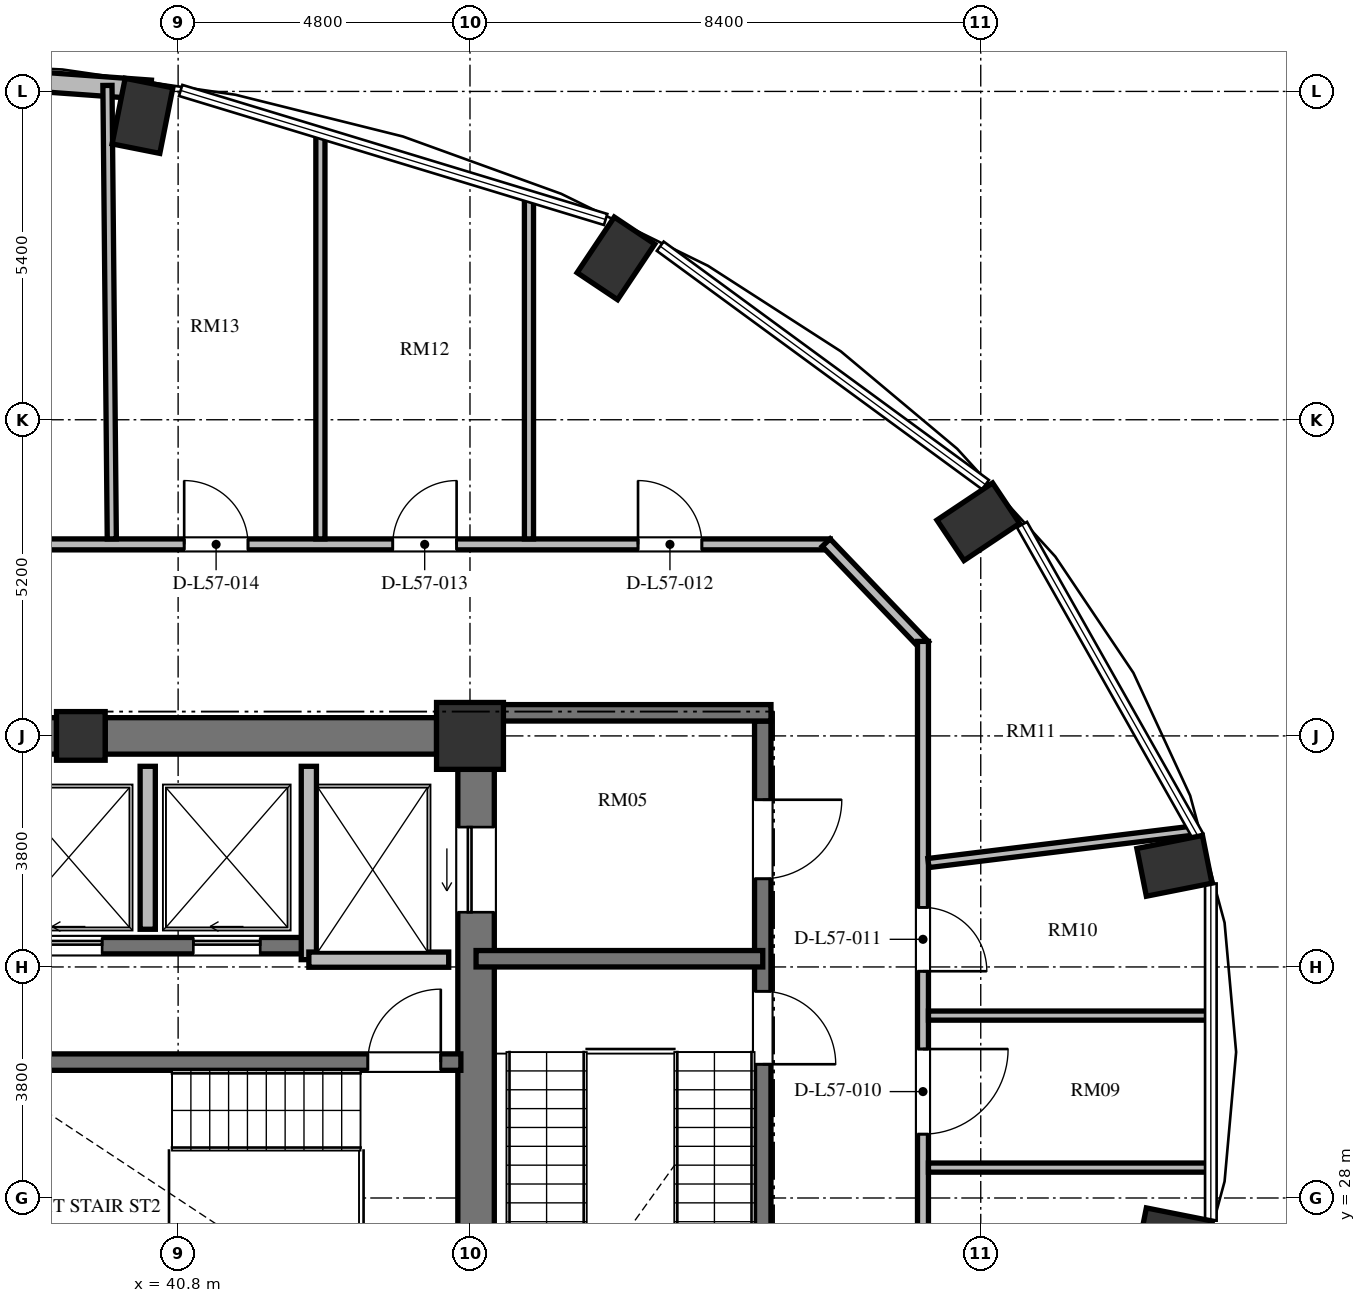
"""IFC4 building model, lengths in metres.
Left out: names, types, materials, properties, quantities, classifications, styles, units other than length and angle.
Written with IfcOpenShell. Run it as: python <this file> out.ifc"""

import sys

from ifc_helpers import new_model, si_unit, direction, frame, frame_2d, origin, origin_2d, place, context, subcontext, project, spatial, rectangle, extrude, element, fill, save


model = new_model("IFC4")
c1 = context("Model", 3, precision=1e-05, world=origin(), true_north=direction((0.0, 1.0)))
c2 = subcontext(c1, "Body", "Model", "MODEL_VIEW")
j1 = project(units=[si_unit("LENGTHUNIT", "METRE"), si_unit("PLANEANGLEUNIT", "RADIAN")], contexts=[c1])
p1 = place(None, origin())
s1 = spatial("IfcSite", under=j1, at=p1, CompositionType="ELEMENT")
p2 = place(p1, origin())
s2 = spatial("IfcBuilding", under=s1, at=p2, CompositionType="ELEMENT")
p3 = place(p2, frame((0.0, 0.0, 220.368)))
s3 = spatial("IfcBuildingStorey", under=s2, at=p3, CompositionType="ELEMENT", Elevation=220.368)
for number, where, z_axis, x_axis in (
    (1, (57.185, 27.337, 0.0), (0.0, 0.0, 1.0), (0.981, -0.195, 0.0)),
    (2, (57.185, 33.463, 0.0), (0.0, 0.0, 1.0), (0.981, 0.195, 0.0)),
    (3, (53.96, 39.123, 0.0), (0.0, 0.0, 1.0), (0.831, 0.556, 0.0)),
    (4, (48.0, 43.454, 0.0), (0.0, 0.0, 1.0), (0.556, 0.831, 0.0)),
    (5, (40.214, 45.798, 0.0), (0.0, 0.0, 1.0), (0.195, 0.981, 0.0)),
):
    element("IfcColumn", number, at=place(p3, frame(where, z_axis=z_axis, x_axis=x_axis)), inside=s3, PredefinedType="COLUMN", context=c2, shape_type="SweptSolid", body=[
        extrude(rectangle(XDim=1.1, YDim=0.8, at=origin_2d()), origin(), (0.0, 0.0, 1.0), 3.648),
    ])
p4 = place(p3, frame((45.6, 35.6, 0.0), z_axis=(0.0, 0.0, 1.0), x_axis=(1.0, 0.0, 0.0)))
e6 = element("IfcColumn", 6, at=p4, inside=s3, PredefinedType="COLUMN", context=c2, shape_type="SweptSolid", body=[
    extrude(rectangle(XDim=1.1, YDim=1.1, at=origin_2d()), origin(), (0.0, 0.0, 1.0), 3.648),
])
p5 = place(p3, frame((39.2, 35.6, 0.0), z_axis=(0.0, 0.0, 1.0), x_axis=(1.0, 0.0, 0.0)))
e7 = element("IfcColumn", 7, at=p5, inside=s3, PredefinedType="COLUMN", context=c2, shape_type="SweptSolid", body=[
    extrude(rectangle(XDim=0.8, YDim=0.8, at=origin_2d()), origin(), (0.0, 0.0, 1.0), 3.648),
])
p6 = place(p3, frame((45.7, 20.95, 0.0), z_axis=(0.0, 0.0, 1.0), x_axis=(0.0, 1.0, 0.0)))
e8 = element("IfcWall", 8, at=p6, inside=s3, PredefinedType="SHEAR", context=c2, shape_type="SweptSolid", body=[
    extrude(rectangle(XDim=14.1, YDim=0.6, at=frame_2d((7.05, 0.0))), origin(), (0.0, 0.0, 1.0), 3.648),
])
p7 = place(p6, frame((11.75, 0.0, 0.0)))
e9 = element("IfcOpeningElement", 9, at=p7, cuts=e8, PredefinedType="OPENING", context=c2, shape_type="SweptSolid", body=[
    extrude(rectangle(XDim=1.4, YDim=2.3, at=frame_2d((0.7, 1.15))), frame((0.0, 0.31, 0.0), z_axis=(0.0, -1.0, 0.0), x_axis=(1.0, 0.0, 0.0)), (0.0, 0.0, 1.0), 0.62),
])
p8 = place(p6, frame((0.95, 0.0, 0.0)))
e10 = element("IfcOpeningElement", 10, at=p8, cuts=e8, PredefinedType="OPENING", context=c2, shape_type="SweptSolid", body=[
    extrude(rectangle(XDim=1.4, YDim=2.3, at=frame_2d((0.7, 1.15))), frame((0.0, 0.31, 0.0), z_axis=(0.0, -1.0, 0.0), x_axis=(1.0, 0.0, 0.0)), (0.0, 0.0, 1.0), 0.62),
])
p9 = place(p3, frame((33.2, 35.6, 0.0), z_axis=(0.0, 0.0, 1.0), x_axis=(1.0, 0.0, 0.0)))
e11 = element("IfcWall", 11, at=p9, inside=s3, PredefinedType="SHEAR", context=c2, shape_type="SweptSolid", body=[
    extrude(rectangle(XDim=5.6, YDim=0.6, at=frame_2d((2.8, 0.0))), origin(), (0.0, 0.0, 1.0), 3.648),
])
p10 = place(p3, frame((39.6, 35.6, 0.0), z_axis=(0.0, 0.0, 1.0), x_axis=(1.0, 0.0, 0.0)))
e12 = element("IfcWall", 12, at=p10, inside=s3, PredefinedType="SHEAR", context=c2, shape_type="SweptSolid", body=[
    extrude(rectangle(XDim=5.45, YDim=0.6, at=frame_2d((2.725, 0.0))), origin(), (0.0, 0.0, 1.0), 3.648),
])
p11 = place(p3, frame((40.35, 46.226, 0.0), z_axis=(0.0, 0.0, 1.0), x_axis=(-0.997409061056, 0.071938619141, 0.0)))
e13 = element("IfcWall", 13, at=p11, inside=s3, PredefinedType="SOLIDWALL", context=c2, shape_type="SweptSolid", body=[
    extrude(rectangle(XDim=4.541, YDim=0.32, at=frame_2d((2.271, 0.0))), origin(), (0.0, 0.0, 1.0), 3.448),
])
p12 = place(p11, frame((1.67, 0.0, 0.85)))
e14 = element("IfcOpeningElement", 14, at=p12, cuts=e13, PredefinedType="OPENING", context=c2, shape_type="SweptSolid", body=[
    extrude(rectangle(XDim=1.2, YDim=2.2, at=frame_2d((0.6, 1.1))), frame((0.0, 0.17, 0.0), z_axis=(0.0, -1.0, 0.0), x_axis=(1.0, 0.0, 0.0)), (0.0, 0.0, 1.0), 0.34),
])
p13 = place(p3, frame((37.465, 30.235, 0.0), z_axis=(0.0, 0.0, 1.0), x_axis=(1.0, 0.0, 0.0)))
e15 = element("IfcWall", 15, at=p13, inside=s3, PredefinedType="SHEAR", context=c2, shape_type="SweptSolid", body=[
    extrude(rectangle(XDim=7.985, YDim=0.27, at=frame_2d((3.992, 0.0))), origin(), (0.0, 0.0, 1.0), 3.648),
])
p14 = place(p13, frame((6.455, 0.0, 0.0)))
e16 = element("IfcOpeningElement", 16, at=p14, cuts=e15, PredefinedType="OPENING", context=c2, shape_type="SweptSolid", body=[
    extrude(rectangle(XDim=1.2, YDim=2.15, at=frame_2d((0.6, 1.075))), frame((0.0, 0.145, 0.0), z_axis=(0.0, -1.0, 0.0), x_axis=(1.0, 0.0, 0.0)), (0.0, 0.0, 1.0), 0.29),
])
p15 = place(p3, frame((26.55, 32.15, 0.0), z_axis=(0.0, 0.0, 1.0), x_axis=(1.0, 0.0, 0.0)))
e17 = element("IfcWall", 17, at=p15, inside=s3, PredefinedType="SHEAR", context=c2, shape_type="SweptSolid", body=[
    extrude(rectangle(XDim=16.4, YDim=0.27, at=frame_2d((8.2, 0.0))), origin(), (0.0, 0.0, 1.0), 3.648),
])
p16 = place(p15, frame((5.125, 0.0, 0.0)))
e18 = element("IfcOpeningElement", 18, at=p16, cuts=e17, PredefinedType="OPENING", context=c2, shape_type="SweptSolid", body=[
    extrude(rectangle(XDim=1.05, YDim=2.15, at=frame_2d((0.525, 1.075))), frame((0.0, 0.145, 0.0), z_axis=(0.0, -1.0, 0.0), x_axis=(1.0, 0.0, 0.0)), (0.0, 0.0, 1.0), 0.29),
])
p17 = place(p15, frame((11.9, 0.0, 0.0)))
e19 = element("IfcOpeningElement", 19, at=p17, cuts=e17, PredefinedType="OPENING", context=c2, shape_type="SweptSolid", body=[
    extrude(rectangle(XDim=1.1, YDim=2.2, at=frame_2d((0.55, 1.1))), frame((0.0, 0.145, 0.0), z_axis=(0.0, -1.0, 0.0), x_axis=(1.0, 0.0, 0.0)), (0.0, 0.0, 1.0), 0.29),
])
p18 = place(p15, frame((14.5, 0.0, 0.0)))
e20 = element("IfcOpeningElement", 20, at=p18, cuts=e17, PredefinedType="OPENING", context=c2, shape_type="SweptSolid", body=[
    extrude(rectangle(XDim=1.1, YDim=2.2, at=frame_2d((0.55, 1.1))), frame((0.0, 0.145, 0.0), z_axis=(0.0, -1.0, 0.0), x_axis=(1.0, 0.0, 0.0)), (0.0, 0.0, 1.0), 0.29),
])
p19 = place(p3, frame((42.95, 31.92, 0.0), z_axis=(0.0, 0.0, 1.0), x_axis=(0.0, 1.0, 0.0)))
e21 = element("IfcWall", 21, at=p19, inside=s3, PredefinedType="SOLIDWALL", context=c2, shape_type="SweptSolid", body=[
    extrude(rectangle(XDim=3.18, YDim=0.25, at=frame_2d((1.59, 0.0))), origin(), (0.0, 0.0, 1.0), 3.448),
])
p20 = place(p3, frame((42.95, 31.92, 0.0), z_axis=(0.0, 0.0, 1.0), x_axis=(1.0, 0.0, 0.0)))
e22 = element("IfcWall", 22, at=p20, inside=s3, PredefinedType="SOLIDWALL", context=c2, shape_type="SweptSolid", body=[
    extrude(rectangle(XDim=2.3, YDim=0.25, at=frame_2d((1.15, 0.0))), origin(), (0.0, 0.0, 1.0), 3.448),
])
p21 = place(p3, frame((40.3, 32.42, 0.0), z_axis=(0.0, 0.0, 1.0), x_axis=(0.0, 1.0, 0.0)))
e23 = element("IfcWall", 23, at=p21, inside=s3, PredefinedType="SOLIDWALL", context=c2, shape_type="SweptSolid", body=[
    extrude(rectangle(XDim=2.68, YDim=0.25, at=frame_2d((1.34, 0.0))), origin(), (0.0, 0.0, 1.0), 3.448),
])
p22 = place(p3, frame((50.415, 35.845, 0.0), z_axis=(0.0, 0.0, 1.0), x_axis=(0.0, -1.0, 0.0)))
e24 = element("IfcWall", 24, at=p22, inside=s3, PredefinedType="SHEAR", context=c2, shape_type="SweptSolid", body=[
    extrude(rectangle(XDim=15.825, YDim=0.27, at=frame_2d((7.913, 0.0))), origin(), (0.0, 0.0, 1.0), 3.648),
])
p23 = place(p22, frame((4.445, 0.0, 0.0)))
e25 = element("IfcOpeningElement", 25, at=p23, cuts=e24, PredefinedType="OPENING", context=c2, shape_type="SweptSolid", body=[
    extrude(rectangle(XDim=1.2, YDim=2.15, at=frame_2d((0.6, 1.075))), frame((0.0, 0.145, 0.0), z_axis=(0.0, -1.0, 0.0), x_axis=(1.0, 0.0, 0.0)), (0.0, 0.0, 1.0), 0.29),
])
p24 = place(p22, frame((1.295, 0.0, 0.0)))
e26 = element("IfcOpeningElement", 26, at=p24, cuts=e24, PredefinedType="OPENING", context=c2, shape_type="SweptSolid", body=[
    extrude(rectangle(XDim=1.3, YDim=2.2, at=frame_2d((0.65, 1.1))), frame((0.0, 0.145, 0.0), z_axis=(0.0, -1.0, 0.0), x_axis=(1.0, 0.0, 0.0)), (0.0, 0.0, 1.0), 0.29),
])
p25 = place(p22, frame((13.095, 0.0, 0.0)))
e27 = element("IfcOpeningElement", 27, at=p25, cuts=e24, PredefinedType="OPENING", context=c2, shape_type="SweptSolid", body=[
    extrude(rectangle(XDim=1.3, YDim=2.2, at=frame_2d((0.65, 1.1))), frame((0.0, 0.145, 0.0), z_axis=(0.0, -1.0, 0.0), x_axis=(1.0, 0.0, 0.0)), (0.0, 0.0, 1.0), 0.29),
])
p26 = place(p3, frame((46.0, 35.98, 0.0), z_axis=(0.0, 0.0, 1.0), x_axis=(1.0, 0.0, 0.0)))
e28 = element("IfcWall", 28, at=p26, inside=s3, PredefinedType="SHEAR", context=c2, shape_type="SweptSolid", body=[
    extrude(rectangle(XDim=4.55, YDim=0.27, at=frame_2d((2.275, 0.0))), origin(), (0.0, 0.0, 1.0), 3.648),
])
p27 = place(p3, frame((45.7, 31.935, 0.0), z_axis=(0.0, 0.0, 1.0), x_axis=(1.0, 0.0, 0.0)))
e29 = element("IfcWall", 29, at=p27, inside=s3, PredefinedType="SHEAR", context=c2, shape_type="SweptSolid", body=[
    extrude(rectangle(XDim=4.715, YDim=0.27, at=frame_2d((2.357, 0.0))), origin(), (0.0, 0.0, 1.0), 3.648),
])
p28 = place(p3, frame((30.71, 38.75, 0.0), z_axis=(0.0, 0.0, 1.0), x_axis=(1.0, 0.0, 0.0)))
e30 = element("IfcWall", 30, at=p28, inside=s3, PredefinedType="PARTITIONING", context=c2, shape_type="SweptSolid", body=[
    extrude(rectangle(XDim=20.815, YDim=0.18, at=frame_2d((10.408, 0.0))), origin(), (0.0, 0.0, 1.0), 3.073),
])
p29 = place(p28, frame((17.654, 0.0, 0.0)))
e31 = element("IfcOpeningElement", 31, at=p29, cuts=e30, PredefinedType="OPENING", context=c2, shape_type="SweptSolid", body=[
    extrude(rectangle(XDim=1.05, YDim=2.15, at=frame_2d((0.525, 1.075))), frame((0.0, 0.1, 0.0), z_axis=(0.0, -1.0, 0.0), x_axis=(1.0, 0.0, 0.0)), (0.0, 0.0, 1.0), 0.2),
])
p30 = place(p28, frame((13.62, 0.0, 0.0)))
e32 = element("IfcOpeningElement", 32, at=p30, cuts=e30, PredefinedType="OPENING", context=c2, shape_type="SweptSolid", body=[
    extrude(rectangle(XDim=1.05, YDim=2.15, at=frame_2d((0.525, 1.075))), frame((0.0, 0.1, 0.0), z_axis=(0.0, -1.0, 0.0), x_axis=(1.0, 0.0, 0.0)), (0.0, 0.0, 1.0), 0.2),
])
p31 = place(p28, frame((10.19, 0.0, 0.0)))
e33 = element("IfcOpeningElement", 33, at=p31, cuts=e30, PredefinedType="OPENING", context=c2, shape_type="SweptSolid", body=[
    extrude(rectangle(XDim=1.05, YDim=2.15, at=frame_2d((0.525, 1.075))), frame((0.0, 0.1, 0.0), z_axis=(0.0, -1.0, 0.0), x_axis=(1.0, 0.0, 0.0)), (0.0, 0.0, 1.0), 0.2),
])
p32 = place(p28, frame((6.765, 0.0, 0.0)))
e34 = element("IfcOpeningElement", 34, at=p32, cuts=e30, PredefinedType="OPENING", context=c2, shape_type="SweptSolid", body=[
    extrude(rectangle(XDim=1.05, YDim=2.15, at=frame_2d((0.525, 1.075))), frame((0.0, 0.1, 0.0), z_axis=(0.0, -1.0, 0.0), x_axis=(1.0, 0.0, 0.0)), (0.0, 0.0, 1.0), 0.2),
])
p33 = place(p28, frame((2.424, 0.0, 0.0)))
e35 = element("IfcOpeningElement", 35, at=p33, cuts=e30, PredefinedType="OPENING", context=c2, shape_type="SweptSolid", body=[
    extrude(rectangle(XDim=1.05, YDim=2.15, at=frame_2d((0.525, 1.075))), frame((0.0, 0.1, 0.0), z_axis=(0.0, -1.0, 0.0), x_axis=(1.0, 0.0, 0.0)), (0.0, 0.0, 1.0), 0.2),
])
p34 = place(p3, frame((51.458, 38.779, 0.0), z_axis=(0.0, 0.0, 1.0), x_axis=(0.691359830363, -0.722510612352, 0.0)))
e36 = element("IfcWall", 36, at=p34, inside=s3, PredefinedType="PARTITIONING", context=c2, shape_type="SweptSolid", body=[
    extrude(rectangle(XDim=2.343, YDim=0.18, at=frame_2d((1.172, 0.0))), origin(), (0.0, 0.0, 1.0), 3.033),
])
p35 = place(p3, frame((53.05, 37.155, 0.0), z_axis=(0.0, 0.0, 1.0), x_axis=(0.0, -1.0, 0.0)))
e37 = element("IfcWall", 37, at=p35, inside=s3, PredefinedType="PARTITIONING", context=c2, shape_type="SweptSolid", body=[
    extrude(rectangle(XDim=13.509, YDim=0.18, at=frame_2d((6.754, 0.0))), origin(), (0.0, 0.0, 1.0), 3.448),
])
p36 = place(p35, frame((10.398, 0.0, 0.0)))
e38 = element("IfcOpeningElement", 38, at=p36, cuts=e37, PredefinedType="OPENING", context=c2, shape_type="SweptSolid", body=[
    extrude(rectangle(XDim=1.05, YDim=2.15, at=frame_2d((0.525, 1.075))), frame((0.0, 0.1, 0.0), z_axis=(0.0, -1.0, 0.0), x_axis=(1.0, 0.0, 0.0)), (0.0, 0.0, 1.0), 0.2),
])
p37 = place(p35, frame((6.705, 0.0, 0.0)))
e39 = element("IfcOpeningElement", 39, at=p37, cuts=e37, PredefinedType="OPENING", context=c2, shape_type="SweptSolid", body=[
    extrude(rectangle(XDim=1.4, YDim=2.2, at=frame_2d((0.7, 1.1))), frame((0.0, 0.1, 0.0), z_axis=(0.0, -1.0, 0.0), x_axis=(1.0, 0.0, 0.0)), (0.0, 0.0, 1.0), 0.2),
])
p38 = place(p35, frame((4.375, 0.0, 0.0)))
e40 = element("IfcOpeningElement", 40, at=p38, cuts=e37, PredefinedType="OPENING", context=c2, shape_type="SweptSolid", body=[
    extrude(rectangle(XDim=1.05, YDim=2.15, at=frame_2d((0.525, 1.075))), frame((0.0, 0.1, 0.0), z_axis=(0.0, -1.0, 0.0), x_axis=(1.0, 0.0, 0.0)), (0.0, 0.0, 1.0), 0.2),
])
for number, where, z_axis, x_axis in (
    (41, (53.14, 28.5, 0.0), (0.0, 0.0, 1.0), (1.0, 0.0, 0.0)),
    (42, (53.14, 31.0, 0.0), (0.0, 0.0, 1.0), (1.0, 0.0, 0.0)),
):
    element("IfcWall", number, at=place(p3, frame(where, z_axis=z_axis, x_axis=x_axis)), inside=s3, PredefinedType="PARTITIONING", context=c2, shape_type="SweptSolid", body=[
        extrude(rectangle(XDim=4.632, YDim=0.15, at=frame_2d((2.316, 0.0))), origin(), (0.0, 0.0, 1.0), 3.448),
    ])
p39 = place(p3, frame((53.139, 33.509, 0.0), z_axis=(0.0, 0.0, 1.0), x_axis=(0.992571001818, 0.121666784083, 0.0)))
e43 = element("IfcWall", 43, at=p39, inside=s3, PredefinedType="PARTITIONING", context=c2, shape_type="SweptSolid", body=[
    extrude(rectangle(XDim=4.417, YDim=0.15, at=frame_2d((2.208, 0.0))), origin(), (0.0, 0.0, 1.0), 3.448),
])
p40 = place(p3, frame((39.709, 38.84, 0.0), z_axis=(0.0, 0.0, 1.0), x_axis=(-0.009590393625, 0.999954011118, 0.0)))
e44 = element("IfcWall", 44, at=p40, inside=s3, PredefinedType="PARTITIONING", context=c2, shape_type="SweptSolid", body=[
    extrude(rectangle(XDim=7.459, YDim=0.15, at=frame_2d((3.729, 0.0))), origin(), (0.0, 0.0, 1.0), 2.933),
])
p41 = place(p3, frame((43.14, 38.84, 0.0), z_axis=(0.0, 0.0, 1.0), x_axis=(0.0, 1.0, 0.0)))
e45 = element("IfcWall", 45, at=p41, inside=s3, PredefinedType="PARTITIONING", context=c2, shape_type="SweptSolid", body=[
    extrude(rectangle(XDim=6.662, YDim=0.15, at=frame_2d((3.331, 0.0))), origin(), (0.0, 0.0, 1.0), 3.448),
])
p42 = place(p3, frame((46.57, 38.84, 0.0), z_axis=(0.0, 0.0, 1.0), x_axis=(0.0, 1.0, 0.0)))
e46 = element("IfcWall", 46, at=p42, inside=s3, PredefinedType="PARTITIONING", context=c2, shape_type="SweptSolid", body=[
    extrude(rectangle(XDim=5.62, YDim=0.15, at=frame_2d((2.81, 0.0))), origin(), (0.0, 0.0, 1.0), 3.448),
])
p43 = place(p14, origin())
e47 = element("IfcDoor", 47, at=p43, inside=s3, OperationType="SINGLE_SWING_RIGHT", PredefinedType="DOOR", context=c2, shape_type="SweptSolid", body=[
    extrude(rectangle(XDim=1.2, YDim=2.15, at=frame_2d((0.6, 1.075))), frame((0.0, 0.025, 0.0), z_axis=(0.0, -1.0, 0.0), x_axis=(1.0, 0.0, 0.0)), (0.0, 0.0, 1.0), 0.05),
])
fill(e16, e47)
p44 = place(p17, origin())
e48 = element("IfcDoor", 48, at=p44, inside=s3, OperationType="SLIDING_TO_LEFT", PredefinedType="DOOR", context=c2, shape_type="SweptSolid", body=[
    extrude(rectangle(XDim=1.1, YDim=2.2, at=frame_2d((0.55, 1.1))), frame((0.0, 0.025, 0.0), z_axis=(0.0, -1.0, 0.0), x_axis=(1.0, 0.0, 0.0)), (0.0, 0.0, 1.0), 0.05),
])
fill(e19, e48)
p45 = place(p18, origin())
e49 = element("IfcDoor", 49, at=p45, inside=s3, OperationType="SLIDING_TO_LEFT", PredefinedType="DOOR", context=c2, shape_type="SweptSolid", body=[
    extrude(rectangle(XDim=1.1, YDim=2.2, at=frame_2d((0.55, 1.1))), frame((0.0, 0.025, 0.0), z_axis=(0.0, -1.0, 0.0), x_axis=(1.0, 0.0, 0.0)), (0.0, 0.0, 1.0), 0.05),
])
fill(e20, e49)
p46 = place(p7, origin())
e50 = element("IfcDoor", 50, at=p46, inside=s3, OperationType="SLIDING_TO_LEFT", PredefinedType="DOOR", context=c2, shape_type="SweptSolid", body=[
    extrude(rectangle(XDim=1.4, YDim=2.3, at=frame_2d((0.7, 1.15))), frame((0.0, 0.025, 0.0), z_axis=(0.0, -1.0, 0.0), x_axis=(1.0, 0.0, 0.0)), (0.0, 0.0, 1.0), 0.05),
])
fill(e9, e50)
p47 = place(p23, origin())
e51 = element("IfcDoor", 51, at=p47, inside=s3, OperationType="SINGLE_SWING_RIGHT", PredefinedType="DOOR", context=c2, shape_type="SweptSolid", body=[
    extrude(rectangle(XDim=1.2, YDim=2.15, at=frame_2d((0.6, 1.075))), frame((0.0, 0.025, 0.0), z_axis=(0.0, -1.0, 0.0), x_axis=(1.0, 0.0, 0.0)), (0.0, 0.0, 1.0), 0.05),
])
fill(e25, e51)
p48 = place(p24, origin())
e52 = element("IfcDoor", 52, at=p48, inside=s3, OperationType="SINGLE_SWING_LEFT", PredefinedType="DOOR", context=c2, shape_type="SweptSolid", body=[
    extrude(rectangle(XDim=1.3, YDim=2.2, at=frame_2d((0.65, 1.1))), frame((0.0, 0.025, 0.0), z_axis=(0.0, -1.0, 0.0), x_axis=(1.0, 0.0, 0.0)), (0.0, 0.0, 1.0), 0.05),
])
fill(e26, e52)
p49 = place(p37, origin())
e53 = element("IfcDoor", 53, at=p49, inside=s3, OperationType="SINGLE_SWING_LEFT", PredefinedType="DOOR", context=c2, shape_type="SweptSolid", body=[
    extrude(rectangle(XDim=1.4, YDim=2.2, at=frame_2d((0.7, 1.1))), frame((0.0, 0.025, 0.0), z_axis=(0.0, -1.0, 0.0), x_axis=(1.0, 0.0, 0.0)), (0.0, 0.0, 1.0), 0.05),
])
fill(e39, e53)
p50 = place(p38, origin())
e54 = element("IfcDoor", 54, at=p50, inside=s3, OperationType="SINGLE_SWING_RIGHT", PredefinedType="DOOR", context=c2, shape_type="SweptSolid", body=[
    extrude(rectangle(XDim=1.05, YDim=2.15, at=frame_2d((0.525, 1.075))), frame((0.0, 0.025, 0.0), z_axis=(0.0, -1.0, 0.0), x_axis=(1.0, 0.0, 0.0)), (0.0, 0.0, 1.0), 0.05),
])
fill(e40, e54)
p51 = place(p29, origin())
e55 = element("IfcDoor", 55, at=p51, inside=s3, OperationType="SINGLE_SWING_LEFT", PredefinedType="DOOR", context=c2, shape_type="SweptSolid", body=[
    extrude(rectangle(XDim=1.05, YDim=2.15, at=frame_2d((0.525, 1.075))), frame((0.0, 0.025, 0.0), z_axis=(0.0, -1.0, 0.0), x_axis=(1.0, 0.0, 0.0)), (0.0, 0.0, 1.0), 0.05),
])
fill(e31, e55)
p52 = place(p30, origin())
e56 = element("IfcDoor", 56, at=p52, inside=s3, OperationType="SINGLE_SWING_RIGHT", PredefinedType="DOOR", context=c2, shape_type="SweptSolid", body=[
    extrude(rectangle(XDim=1.05, YDim=2.15, at=frame_2d((0.525, 1.075))), frame((0.0, 0.025, 0.0), z_axis=(0.0, -1.0, 0.0), x_axis=(1.0, 0.0, 0.0)), (0.0, 0.0, 1.0), 0.05),
])
fill(e32, e56)
p53 = place(p31, origin())
e57 = element("IfcDoor", 57, at=p53, inside=s3, OperationType="SINGLE_SWING_LEFT", PredefinedType="DOOR", context=c2, shape_type="SweptSolid", body=[
    extrude(rectangle(XDim=1.05, YDim=2.15, at=frame_2d((0.525, 1.075))), frame((0.0, 0.025, 0.0), z_axis=(0.0, -1.0, 0.0), x_axis=(1.0, 0.0, 0.0)), (0.0, 0.0, 1.0), 0.05),
])
fill(e33, e57)
save(model, sys.argv[1])
